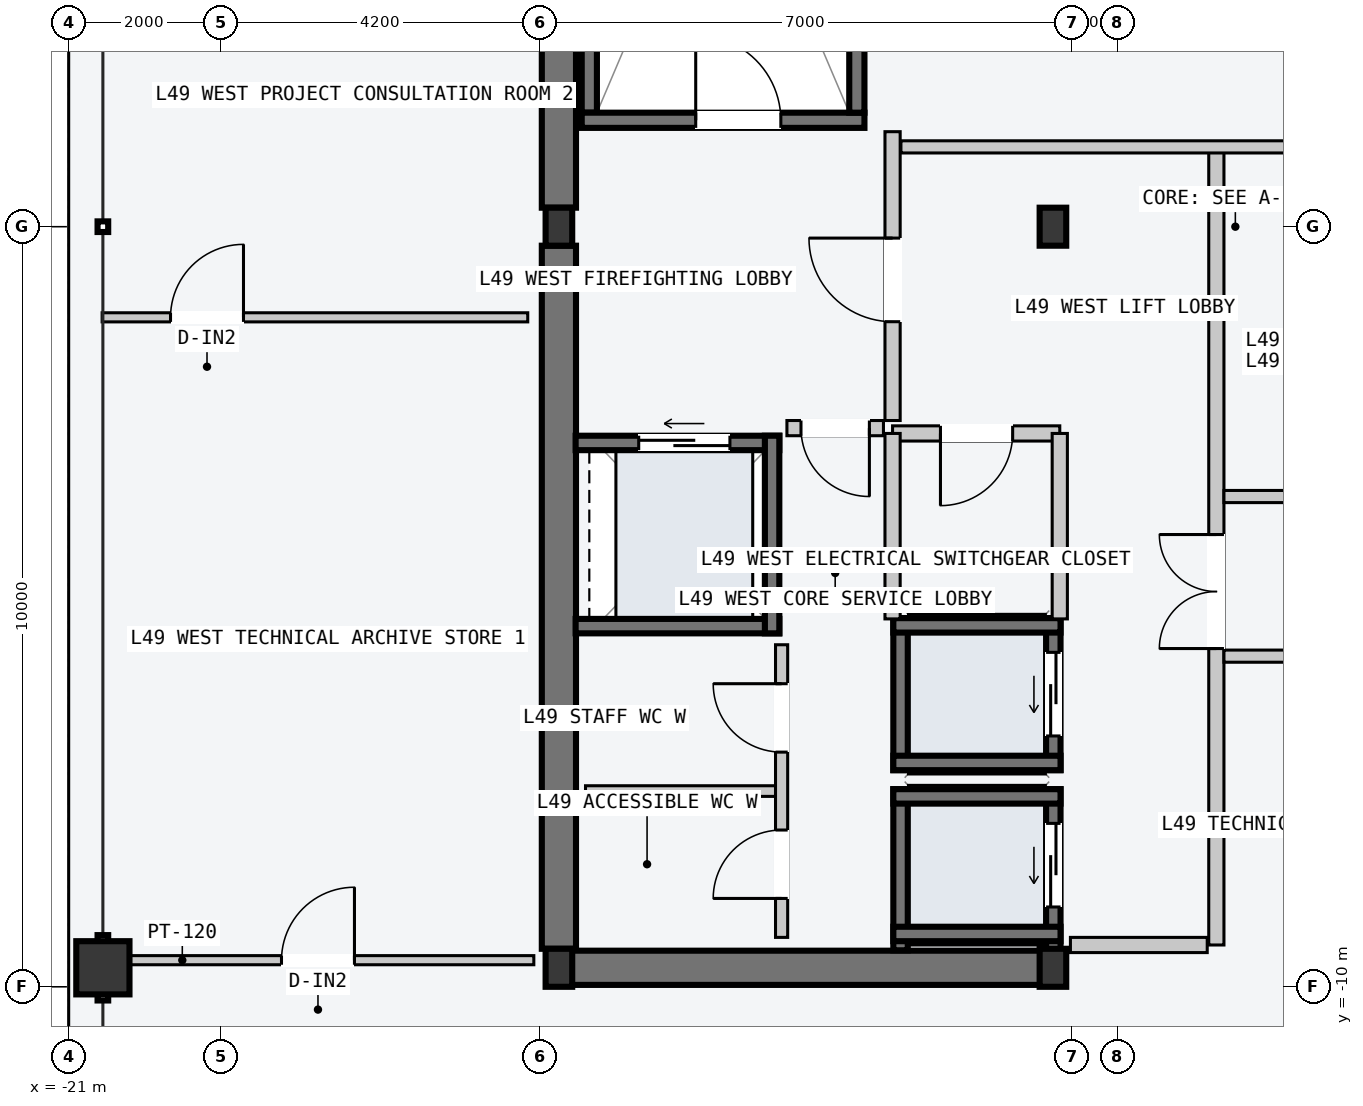
"""IFC4 building model, lengths in metres.
Left out: names, types, materials, properties, quantities, classifications, styles, units other than length and angle.
Written with IfcOpenShell. Run it as: python <this file> out.ifc"""

import sys

from ifc_helpers import new_model, si_unit, direction, frame, frame_2d, origin, origin_2d, place, context, subcontext, project, spatial, rectangle, hollow_rectangle, i_section, extrude, element, fill, save


model = new_model("IFC4")
c1 = context("Model", 3, precision=1e-05, world=origin(), true_north=direction((0.0, 1.0)))
c2 = subcontext(c1, "Body", "Model", "MODEL_VIEW")
j1 = project(units=[si_unit("LENGTHUNIT", "METRE"), si_unit("PLANEANGLEUNIT", "RADIAN")], contexts=[c1])
p1 = place(None, origin())
s1 = spatial("IfcSite", under=j1, at=p1, CompositionType="ELEMENT")
p2 = place(p1, origin())
s2 = spatial("IfcBuilding", under=s1, at=p2, CompositionType="ELEMENT")
p3 = place(p2, frame((0.0, 0.0, 187.5)))
s3 = spatial("IfcBuildingStorey", under=s2, at=p3, CompositionType="ELEMENT", Elevation=187.5)
p4 = place(p3, frame((-14.53, -9.75, -0.2), z_axis=(0.0, 0.0, 1.0), x_axis=(1.0, 0.0, 0.0)))
e1 = element("IfcWall", 1, at=p4, inside=s3, PredefinedType="SHEAR", context=c2, shape_type="SweptSolid", body=[
    extrude(rectangle(XDim=6.46, YDim=0.45, at=frame_2d((3.23, 0.0))), origin(), (0.0, 0.0, 1.0), 3.6),
])
for number, where, z_axis, x_axis in (
    (2, (-14.55, -9.5, -0.2), (0.0, 0.0, 1.0), (0.0, 1.0, 0.0)),
    (3, (-14.55, 0.25, -0.2), (0.0, 0.0, 1.0), (0.0, 1.0, 0.0)),
):
    element("IfcWall", number, at=place(p3, frame(where, z_axis=z_axis, x_axis=x_axis)), inside=s3, PredefinedType="SHEAR", context=c2, shape_type="SweptSolid", body=[
        extrude(rectangle(XDim=9.25, YDim=0.45, at=frame_2d((4.625, 0.0))), origin(), (0.0, 0.0, 1.0), 3.6),
    ])
p5 = place(p3, frame((-14.15, 1.5, -0.2), z_axis=(0.0, 0.0, 1.0), x_axis=(0.0, 1.0, 0.0)))
e4 = element("IfcWall", 4, at=p5, inside=s3, PredefinedType="SOLIDWALL", context=c2, shape_type="SweptSolid", body=[
    extrude(rectangle(XDim=7.8, YDim=0.2, at=frame_2d((3.9, 0.0))), origin(), (0.0, 0.0, 1.0), 3.6),
])
p6 = place(p3, frame((-14.25, 1.4, -0.2), z_axis=(0.0, 0.0, 1.0), x_axis=(1.0, 0.0, 0.0)))
e5 = element("IfcWall", 5, at=p6, inside=s3, PredefinedType="SOLIDWALL", context=c2, shape_type="SweptSolid", body=[
    extrude(rectangle(XDim=3.72, YDim=0.2, at=frame_2d((1.86, 0.0))), origin(), (0.0, 0.0, 1.0), 3.6),
])
p7 = place(p6, frame((1.5, 0.0, 0.2)))
e6 = element("IfcOpeningElement", 6, at=p7, cuts=e5, PredefinedType="OPENING", context=c2, shape_type="SweptSolid", body=[
    extrude(rectangle(XDim=1.12, YDim=2.18, at=frame_2d((0.56, 1.09))), frame((0.0, 0.11, 0.0), z_axis=(0.0, -1.0, 0.0), x_axis=(1.0, 0.0, 0.0)), (0.0, 0.0, 1.0), 0.22),
])
p8 = place(p3, frame((-10.63, 1.5, -0.2), z_axis=(0.0, 0.0, 1.0), x_axis=(0.0, 1.0, 0.0)))
e7 = element("IfcWall", 7, at=p8, inside=s3, PredefinedType="SOLIDWALL", context=c2, shape_type="SweptSolid", body=[
    extrude(rectangle(XDim=7.8, YDim=0.2, at=frame_2d((3.9, 0.0))), origin(), (0.0, 0.0, 1.0), 3.6),
])
for number, where, z_axis, x_axis in (
    (8, (-14.55, -9.75, 0.0), (0.0, 0.0, 1.0), (1.0, 0.0, 0.0)),
    (9, (-14.55, 0.0, 0.0), (0.0, 0.0, 1.0), (1.0, 0.0, 0.0)),
    (10, (-8.05, -9.75, 0.0), (0.0, 0.0, 1.0), (1.0, 0.0, 0.0)),
    (11, (-8.05, 0.0, 0.0), (0.0, 0.0, 1.0), (1.0, 0.0, 0.0)),
):
    element("IfcColumn", number, at=place(p3, frame(where, z_axis=z_axis, x_axis=x_axis)), inside=s3, PredefinedType="COLUMN", context=c2, shape_type="SweptSolid", body=[
        extrude(i_section(OverallWidth=0.35, OverallDepth=0.5, WebThickness=0.02, FlangeThickness=0.032, at=origin_2d()), origin(), (0.0, 0.0, 1.0), 3.6),
    ])
p9 = place(p3, frame((-20.55, -9.75, 0.0), z_axis=(0.0, 0.0, 1.0), x_axis=(0.0, 1.0, 0.0)))
e12 = element("IfcColumn", 12, at=p9, inside=s3, PredefinedType="COLUMN", context=c2, shape_type="SweptSolid", body=[
    extrude(hollow_rectangle(XDim=0.7, YDim=0.7, WallThickness=0.03, at=origin_2d()), origin(), (0.0, 0.0, 1.0), 3.6),
])
p10 = place(p3, frame((-8.045, -9.52, -0.2), z_axis=(0.0, 0.0, 1.0), x_axis=(0.0, 1.0, 0.0)))
e13 = element("IfcWall", 13, at=p10, inside=s3, PredefinedType="SOLIDWALL", context=c2, shape_type="SweptSolid", body=[
    extrude(rectangle(XDim=2.12, YDim=0.19, at=frame_2d((1.06, 0.0))), origin(), (0.0, 0.0, 1.0), 3.6),
])
p11 = place(p10, frame((0.57, 0.0, 0.2)))
e14 = element("IfcOpeningElement", 14, at=p11, cuts=e13, PredefinedType="OPENING", context=c2, shape_type="SweptSolid", body=[
    extrude(rectangle(XDim=1.1, YDim=2.2, at=frame_2d((0.55, 1.1))), frame((0.0, 0.105, 0.0), z_axis=(0.0, -1.0, 0.0), x_axis=(1.0, 0.0, 0.0)), (0.0, 0.0, 1.0), 0.21),
])
p12 = place(p3, frame((-10.055, -9.52, -0.2), z_axis=(0.0, 0.0, 1.0), x_axis=(0.0, 1.0, 0.0)))
e15 = element("IfcWall", 15, at=p12, inside=s3, PredefinedType="SOLIDWALL", context=c2, shape_type="SweptSolid", body=[
    extrude(rectangle(XDim=2.12, YDim=0.19, at=frame_2d((1.06, 0.0))), origin(), (0.0, 0.0, 1.0), 3.6),
])
for number, where, z_axis, x_axis in (
    (16, (-10.15, -7.495, -0.2), (0.0, 0.0, 1.0), (1.0, 0.0, 0.0)),
    (17, (-10.15, -9.305, -0.2), (0.0, 0.0, 1.0), (1.0, 0.0, 0.0)),
):
    element("IfcWall", number, at=place(p3, frame(where, z_axis=z_axis, x_axis=x_axis)), inside=s3, PredefinedType="SOLIDWALL", context=c2, shape_type="SweptSolid", body=[
        extrude(rectangle(XDim=2.2, YDim=0.19, at=frame_2d((1.1, 0.0))), origin(), (0.0, 0.0, 1.0), 3.6),
    ])
p13 = place(p3, frame((-8.045, -7.15, -0.2), z_axis=(0.0, 0.0, 1.0), x_axis=(0.0, 1.0, 0.0)))
e18 = element("IfcWall", 18, at=p13, inside=s3, PredefinedType="SOLIDWALL", context=c2, shape_type="SweptSolid", body=[
    extrude(rectangle(XDim=2.0, YDim=0.19, at=frame_2d((1.0, 0.0))), origin(), (0.0, 0.0, 1.0), 3.6),
])
p14 = place(p13, frame((0.45, 0.0, 0.2)))
e19 = element("IfcOpeningElement", 19, at=p14, cuts=e18, PredefinedType="OPENING", context=c2, shape_type="SweptSolid", body=[
    extrude(rectangle(XDim=1.1, YDim=2.2, at=frame_2d((0.55, 1.1))), frame((0.0, 0.105, 0.0), z_axis=(0.0, -1.0, 0.0), x_axis=(1.0, 0.0, 0.0)), (0.0, 0.0, 1.0), 0.21),
])
p15 = place(p3, frame((-10.055, -7.15, -0.2), z_axis=(0.0, 0.0, 1.0), x_axis=(0.0, 1.0, 0.0)))
e20 = element("IfcWall", 20, at=p15, inside=s3, PredefinedType="SOLIDWALL", context=c2, shape_type="SweptSolid", body=[
    extrude(rectangle(XDim=2.0, YDim=0.19, at=frame_2d((1.0, 0.0))), origin(), (0.0, 0.0, 1.0), 3.6),
])
for number, where, z_axis, x_axis in (
    (21, (-10.15, -5.245, -0.2), (0.0, 0.0, 1.0), (1.0, 0.0, 0.0)),
    (22, (-10.15, -7.055, -0.2), (0.0, 0.0, 1.0), (1.0, 0.0, 0.0)),
):
    element("IfcWall", number, at=place(p3, frame(where, z_axis=z_axis, x_axis=x_axis)), inside=s3, PredefinedType="SOLIDWALL", context=c2, shape_type="SweptSolid", body=[
        extrude(rectangle(XDim=2.2, YDim=0.19, at=frame_2d((1.1, 0.0))), origin(), (0.0, 0.0, 1.0), 3.6),
    ])
p16 = place(p3, frame((-14.33, -2.845, -0.2), z_axis=(0.0, 0.0, 1.0), x_axis=(1.0, 0.0, 0.0)))
e23 = element("IfcWall", 23, at=p16, inside=s3, PredefinedType="SOLIDWALL", context=c2, shape_type="SweptSolid", body=[
    extrude(rectangle(XDim=2.68, YDim=0.19, at=frame_2d((1.34, 0.0))), origin(), (0.0, 0.0, 1.0), 3.6),
])
p17 = place(p16, frame((0.83, 0.0, 0.2)))
e24 = element("IfcOpeningElement", 24, at=p17, cuts=e23, PredefinedType="OPENING", context=c2, shape_type="SweptSolid", body=[
    extrude(rectangle(XDim=1.2, YDim=2.2, at=frame_2d((0.6, 1.1))), frame((0.0, 0.105, 0.0), z_axis=(0.0, -1.0, 0.0), x_axis=(1.0, 0.0, 0.0)), (0.0, 0.0, 1.0), 0.21),
])
p18 = place(p3, frame((-14.33, -5.255, -0.2), z_axis=(0.0, 0.0, 1.0), x_axis=(1.0, 0.0, 0.0)))
e25 = element("IfcWall", 25, at=p18, inside=s3, PredefinedType="SOLIDWALL", context=c2, shape_type="SweptSolid", body=[
    extrude(rectangle(XDim=2.68, YDim=0.19, at=frame_2d((1.34, 0.0))), origin(), (0.0, 0.0, 1.0), 3.6),
])
p19 = place(p3, frame((-11.745, -5.35, -0.2), z_axis=(0.0, 0.0, 1.0), x_axis=(0.0, 1.0, 0.0)))
e26 = element("IfcWall", 26, at=p19, inside=s3, PredefinedType="SOLIDWALL", context=c2, shape_type="SweptSolid", body=[
    extrude(rectangle(XDim=2.6, YDim=0.19, at=frame_2d((1.3, 0.0))), origin(), (0.0, 0.0, 1.0), 3.6),
])
p20 = place(p3, frame((-5.9, -9.45, 0.0), z_axis=(0.0, 0.0, 1.0), x_axis=(0.0, 1.0, 0.0)))
e27 = element("IfcWall", 27, at=p20, inside=s3, PredefinedType="PARTITIONING", context=c2, shape_type="SweptSolid", body=[
    extrude(rectangle(XDim=10.5, YDim=0.2, at=frame_2d((5.25, 0.0))), origin(), (0.0, 0.0, 1.0), 3.4),
])
p21 = place(p20, frame((3.9, 0.0, 0.0)))
e28 = element("IfcOpeningElement", 28, at=p21, cuts=e27, PredefinedType="OPENING", context=c2, shape_type="SweptSolid", body=[
    extrude(rectangle(XDim=1.5, YDim=2.2, at=frame_2d((0.75, 1.1))), frame((0.0, 0.11, 0.0), z_axis=(0.0, -1.0, 0.0), x_axis=(1.0, 0.0, 0.0)), (0.0, 0.0, 1.0), 0.22),
])
p22 = place(p3, frame((-6.02, -9.45, 0.0), z_axis=(0.0, 0.0, 1.0), x_axis=(-1.0, 0.0, 0.0)))
e29 = element("IfcWall", 29, at=p22, inside=s3, PredefinedType="PARTITIONING", context=c2, shape_type="SweptSolid", body=[
    extrude(rectangle(XDim=1.8, YDim=0.2, at=frame_2d((0.9, 0.0))), origin(), (0.0, 0.0, 1.0), 3.4),
])
p23 = place(p3, frame((-10.16, -2.55, 0.0), z_axis=(0.0, 0.0, 1.0), x_axis=(0.0, 1.0, 0.0)))
e30 = element("IfcWall", 30, at=p23, inside=s3, PredefinedType="PARTITIONING", context=c2, shape_type="SweptSolid", body=[
    extrude(rectangle(XDim=3.8, YDim=0.2, at=frame_2d((1.9, 0.0))), origin(), (0.0, 0.0, 1.0), 3.4),
])
p24 = place(p23, frame((1.3, 0.0, 0.0)))
e31 = element("IfcOpeningElement", 31, at=p24, cuts=e30, PredefinedType="OPENING", context=c2, shape_type="SweptSolid", body=[
    extrude(rectangle(XDim=1.1, YDim=2.15, at=frame_2d((0.55, 1.075))), frame((0.0, 0.11, 0.0), z_axis=(0.0, -1.0, 0.0), x_axis=(1.0, 0.0, 0.0)), (0.0, 0.0, 1.0), 0.22),
])
p25 = place(p3, frame((-10.28, -2.65, 0.0), z_axis=(0.0, 0.0, 1.0), x_axis=(-1.0, 0.0, 0.0)))
e32 = element("IfcWall", 32, at=p25, inside=s3, PredefinedType="PARTITIONING", context=c2, shape_type="SweptSolid", body=[
    extrude(rectangle(XDim=1.27, YDim=0.2, at=frame_2d((0.635, 0.0))), origin(), (0.0, 0.0, 1.0), 3.4),
])
p26 = place(p25, frame((0.185, 0.0, 0.0)))
e33 = element("IfcOpeningElement", 33, at=p26, cuts=e32, PredefinedType="OPENING", context=c2, shape_type="SweptSolid", body=[
    extrude(rectangle(XDim=0.9, YDim=2.15, at=frame_2d((0.45, 1.075))), frame((0.0, 0.11, 0.0), z_axis=(0.0, -1.0, 0.0), x_axis=(1.0, 0.0, 0.0)), (0.0, 0.0, 1.0), 0.22),
])
p27 = place(p3, frame((-7.96, -2.72, 0.0), z_axis=(0.0, 0.0, 1.0), x_axis=(-1.0, 0.0, 0.0)))
e34 = element("IfcWall", 34, at=p27, inside=s3, PredefinedType="PARTITIONING", context=c2, shape_type="SweptSolid", body=[
    extrude(rectangle(XDim=2.2, YDim=0.2, at=frame_2d((1.1, 0.0))), origin(), (0.0, 0.0, 1.0), 3.4),
])
p28 = place(p27, frame((0.62, 0.0, 0.0)))
e35 = element("IfcOpeningElement", 35, at=p28, cuts=e34, PredefinedType="OPENING", context=c2, shape_type="SweptSolid", body=[
    extrude(rectangle(XDim=0.95, YDim=2.1, at=frame_2d((0.475, 1.05))), frame((0.0, 0.11, 0.0), z_axis=(0.0, -1.0, 0.0), x_axis=(1.0, 0.0, 0.0)), (0.0, 0.0, 1.0), 0.22),
])
for number, where, z_axis, x_axis in (
    (36, (-7.96, -5.16, 0.0), (0.0, 0.0, 1.0), (0.0, 1.0, 0.0)),
    (37, (-10.16, -5.16, 0.0), (0.0, 0.0, 1.0), (0.0, 1.0, 0.0)),
):
    element("IfcWall", number, at=place(p3, frame(where, z_axis=z_axis, x_axis=x_axis)), inside=s3, PredefinedType="PARTITIONING", context=c2, shape_type="SweptSolid", body=[
        extrude(rectangle(XDim=2.44, YDim=0.2, at=frame_2d((1.22, 0.0))), origin(), (0.0, 0.0, 1.0), 3.4),
    ])
p29 = place(p3, frame((-11.7, -7.425, 0.0), z_axis=(0.0, 0.0, 1.0), x_axis=(-1.0, 0.0, 0.0)))
e38 = element("IfcWall", 38, at=p29, inside=s3, PredefinedType="PARTITIONING", context=c2, shape_type="SweptSolid", body=[
    extrude(rectangle(XDim=2.5, YDim=0.14, at=frame_2d((1.25, 0.0))), origin(), (0.0, 0.0, 1.0), 3.4),
])
p30 = place(p3, frame((-11.62, -9.35, 0.0), z_axis=(0.0, 0.0, 1.0), x_axis=(0.0, 1.0, 0.0)))
e39 = element("IfcWall", 39, at=p30, inside=s3, PredefinedType="PARTITIONING", context=c2, shape_type="SweptSolid", body=[
    extrude(rectangle(XDim=3.85, YDim=0.16, at=frame_2d((1.925, 0.0))), origin(), (0.0, 0.0, 1.0), 3.4),
])
p31 = place(p30, frame((0.512, 0.0, 0.0)))
e40 = element("IfcOpeningElement", 40, at=p31, cuts=e39, PredefinedType="OPENING", context=c2, shape_type="SweptSolid", body=[
    extrude(rectangle(XDim=0.9, YDim=2.15, at=frame_2d((0.45, 1.075))), frame((0.0, 0.09, 0.0), z_axis=(0.0, -1.0, 0.0), x_axis=(1.0, 0.0, 0.0)), (0.0, 0.0, 1.0), 0.18),
])
p32 = place(p30, frame((2.438, 0.0, 0.0)))
e41 = element("IfcOpeningElement", 41, at=p32, cuts=e39, PredefinedType="OPENING", context=c2, shape_type="SweptSolid", body=[
    extrude(rectangle(XDim=0.9, YDim=2.15, at=frame_2d((0.45, 1.075))), frame((0.0, 0.09, 0.0), z_axis=(0.0, -1.0, 0.0), x_axis=(1.0, 0.0, 0.0)), (0.0, 0.0, 1.0), 0.18),
])
p33 = place(p3, frame((-10.05, 1.05, 0.0), z_axis=(0.0, 0.0, 1.0), x_axis=(1.0, 0.0, 0.0)))
e42 = element("IfcWall", 42, at=p33, inside=s3, PredefinedType="PARTITIONING", context=c2, shape_type="SweptSolid", body=[
    extrude(rectangle(XDim=8.79, YDim=0.16, at=frame_2d((4.395, 0.0))), origin(), (0.0, 0.0, 1.0), 3.4),
])
for number, where, z_axis, x_axis in (
    (43, (-5.8, -3.55, 0.0), (0.0, 0.0, 1.0), (1.0, 0.0, 0.0)),
    (44, (-5.8, -5.65, 0.0), (0.0, 0.0, 1.0), (1.0, 0.0, 0.0)),
):
    element("IfcWall", number, at=place(p3, frame(where, z_axis=z_axis, x_axis=x_axis)), inside=s3, PredefinedType="PARTITIONING", context=c2, shape_type="SweptSolid", body=[
        extrude(rectangle(XDim=4.54, YDim=0.16, at=frame_2d((2.27, 0.0))), origin(), (0.0, 0.0, 1.0), 3.4),
    ])
p34 = place(p3, frame((-20.56, -9.65, 0.0), z_axis=(0.0, 0.0, 1.0), x_axis=(1.0, 0.0, 0.0)))
e45 = element("IfcWall", 45, at=p34, inside=s3, PredefinedType="PARTITIONING", context=c2, shape_type="SweptSolid", body=[
    extrude(rectangle(XDim=5.68, YDim=0.12, at=frame_2d((2.84, 0.0))), origin(), (0.0, 0.0, 1.0), 2.75),
])
p35 = place(p34, frame((2.36, 0.0, 0.0)))
e46 = element("IfcOpeningElement", 46, at=p35, cuts=e45, PredefinedType="OPENING", context=c2, shape_type="SweptSolid", body=[
    extrude(rectangle(XDim=0.96, YDim=2.18, at=frame_2d((0.48, 1.09))), frame((0.0, 0.07, 0.0), z_axis=(0.0, -1.0, 0.0), x_axis=(1.0, 0.0, 0.0)), (0.0, 0.0, 1.0), 0.14),
])
p36 = place(p3, frame((-20.56, -1.192, 0.0), z_axis=(0.0, 0.0, 1.0), x_axis=(1.0, 0.0, 0.0)))
e47 = element("IfcWall", 47, at=p36, inside=s3, PredefinedType="PARTITIONING", context=c2, shape_type="SweptSolid", body=[
    extrude(rectangle(XDim=5.6, YDim=0.12, at=frame_2d((2.8, 0.0))), origin(), (0.0, 0.0, 1.0), 3.4),
])
p37 = place(p36, frame((0.9, 0.0, 0.0)))
e48 = element("IfcOpeningElement", 48, at=p37, cuts=e47, PredefinedType="OPENING", context=c2, shape_type="SweptSolid", body=[
    extrude(rectangle(XDim=0.96, YDim=2.18, at=frame_2d((0.48, 1.09))), frame((0.0, 0.07, 0.0), z_axis=(0.0, -1.0, 0.0), x_axis=(1.0, 0.0, 0.0)), (0.0, 0.0, 1.0), 0.14),
])
p38 = place(p7, origin())
e49 = element("IfcDoor", 49, at=p38, inside=s3, OperationType="SINGLE_SWING_LEFT", PredefinedType="DOOR", context=c2, shape_type="SweptSolid", body=[
    extrude(rectangle(XDim=1.12, YDim=2.18, at=frame_2d((0.56, 1.09))), frame((0.0, 0.025, 0.0), z_axis=(0.0, -1.0, 0.0), x_axis=(1.0, 0.0, 0.0)), (0.0, 0.0, 1.0), 0.05),
])
fill(e6, e49)
p39 = place(p11, origin())
e50 = element("IfcDoor", 50, at=p39, inside=s3, OperationType="SLIDING_TO_LEFT", PredefinedType="DOOR", context=c2, shape_type="SweptSolid", body=[
    extrude(rectangle(XDim=1.1, YDim=2.2, at=frame_2d((0.55, 1.1))), frame((0.0, 0.025, 0.0), z_axis=(0.0, -1.0, 0.0), x_axis=(1.0, 0.0, 0.0)), (0.0, 0.0, 1.0), 0.05),
])
fill(e14, e50)
p40 = place(p14, origin())
e51 = element("IfcDoor", 51, at=p40, inside=s3, OperationType="SLIDING_TO_LEFT", PredefinedType="DOOR", context=c2, shape_type="SweptSolid", body=[
    extrude(rectangle(XDim=1.1, YDim=2.2, at=frame_2d((0.55, 1.1))), frame((0.0, 0.025, 0.0), z_axis=(0.0, -1.0, 0.0), x_axis=(1.0, 0.0, 0.0)), (0.0, 0.0, 1.0), 0.05),
])
fill(e19, e51)
p41 = place(p17, origin())
e52 = element("IfcDoor", 52, at=p41, inside=s3, OperationType="SLIDING_TO_LEFT", PredefinedType="DOOR", context=c2, shape_type="SweptSolid", body=[
    extrude(rectangle(XDim=1.2, YDim=2.2, at=frame_2d((0.6, 1.1))), frame((0.0, 0.025, 0.0), z_axis=(0.0, -1.0, 0.0), x_axis=(1.0, 0.0, 0.0)), (0.0, 0.0, 1.0), 0.05),
])
fill(e24, e52)
p42 = place(p21, origin())
e53 = element("IfcDoor", 53, at=p42, inside=s3, OperationType="DOUBLE_DOOR_SINGLE_SWING", PredefinedType="DOOR", context=c2, shape_type="SweptSolid", body=[
    extrude(rectangle(XDim=1.5, YDim=2.2, at=frame_2d((0.75, 1.1))), frame((0.0, 0.025, 0.0), z_axis=(0.0, -1.0, 0.0), x_axis=(1.0, 0.0, 0.0)), (0.0, 0.0, 1.0), 0.05),
])
fill(e28, e53)
p43 = place(p24, origin())
e54 = element("IfcDoor", 54, at=p43, inside=s3, OperationType="SINGLE_SWING_RIGHT", PredefinedType="DOOR", context=c2, shape_type="SweptSolid", body=[
    extrude(rectangle(XDim=1.1, YDim=2.15, at=frame_2d((0.55, 1.075))), frame((0.0, 0.025, 0.0), z_axis=(0.0, -1.0, 0.0), x_axis=(1.0, 0.0, 0.0)), (0.0, 0.0, 1.0), 0.05),
])
fill(e31, e54)
p44 = place(p26, origin())
e55 = element("IfcDoor", 55, at=p44, inside=s3, OperationType="SINGLE_SWING_LEFT", PredefinedType="DOOR", context=c2, shape_type="SweptSolid", body=[
    extrude(rectangle(XDim=0.9, YDim=2.15, at=frame_2d((0.45, 1.075))), frame((0.0, 0.025, 0.0), z_axis=(0.0, -1.0, 0.0), x_axis=(1.0, 0.0, 0.0)), (0.0, 0.0, 1.0), 0.05),
])
fill(e33, e55)
p45 = place(p28, origin())
e56 = element("IfcDoor", 56, at=p45, inside=s3, OperationType="SINGLE_SWING_RIGHT", PredefinedType="DOOR", context=c2, shape_type="SweptSolid", body=[
    extrude(rectangle(XDim=0.95, YDim=2.1, at=frame_2d((0.475, 1.05))), frame((0.0, 0.025, 0.0), z_axis=(0.0, -1.0, 0.0), x_axis=(1.0, 0.0, 0.0)), (0.0, 0.0, 1.0), 0.05),
])
fill(e35, e56)
p46 = place(p31, origin())
e57 = element("IfcDoor", 57, at=p46, inside=s3, OperationType="SINGLE_SWING_LEFT", PredefinedType="DOOR", context=c2, shape_type="SweptSolid", body=[
    extrude(rectangle(XDim=0.9, YDim=2.15, at=frame_2d((0.45, 1.075))), frame((0.0, 0.025, 0.0), z_axis=(0.0, -1.0, 0.0), x_axis=(1.0, 0.0, 0.0)), (0.0, 0.0, 1.0), 0.05),
])
fill(e40, e57)
p47 = place(p32, origin())
e58 = element("IfcDoor", 58, at=p47, inside=s3, OperationType="SINGLE_SWING_RIGHT", PredefinedType="DOOR", context=c2, shape_type="SweptSolid", body=[
    extrude(rectangle(XDim=0.9, YDim=2.15, at=frame_2d((0.45, 1.075))), frame((0.0, 0.025, 0.0), z_axis=(0.0, -1.0, 0.0), x_axis=(1.0, 0.0, 0.0)), (0.0, 0.0, 1.0), 0.05),
])
fill(e41, e58)
p48 = place(p35, origin())
e59 = element("IfcDoor", 59, at=p48, inside=s3, OperationType="SINGLE_SWING_RIGHT", PredefinedType="DOOR", context=c2, shape_type="SweptSolid", body=[
    extrude(rectangle(XDim=0.96, YDim=2.18, at=frame_2d((0.48, 1.09))), frame((0.0, 0.025, 0.0), z_axis=(0.0, -1.0, 0.0), x_axis=(1.0, 0.0, 0.0)), (0.0, 0.0, 1.0), 0.05),
])
fill(e46, e59)
p49 = place(p37, origin())
e60 = element("IfcDoor", 60, at=p49, inside=s3, OperationType="SINGLE_SWING_RIGHT", PredefinedType="DOOR", context=c2, shape_type="SweptSolid", body=[
    extrude(rectangle(XDim=0.96, YDim=2.18, at=frame_2d((0.48, 1.09))), frame((0.0, 0.025, 0.0), z_axis=(0.0, -1.0, 0.0), x_axis=(1.0, 0.0, 0.0)), (0.0, 0.0, 1.0), 0.05),
])
fill(e48, e60)
save(model, sys.argv[1])
